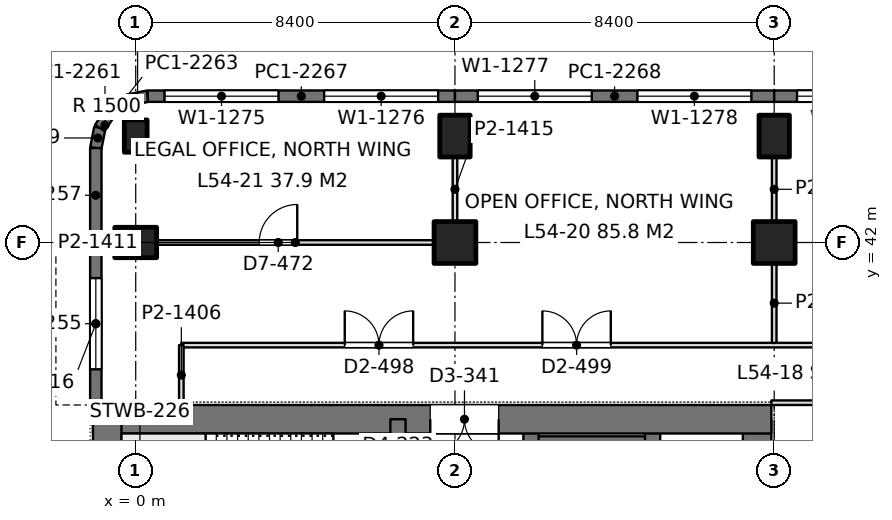
"""IFC4 building model, lengths in metres.
Left out: names, types, materials, properties, quantities, classifications, styles, units other than length and angle.
Written with IfcOpenShell. Run it as: python <this file> out.ifc"""

import sys

from ifc_helpers import new_model, si_unit, direction, frame, frame_2d, origin, origin_2d, place, context, subcontext, project, spatial, rectangle, extrude, element, fill, save


model = new_model("IFC4")
c1 = context("Model", 3, precision=1e-05, world=origin(), true_north=direction((0.0, 1.0)))
c2 = subcontext(c1, "Body", "Model", "MODEL_VIEW")
j1 = project(units=[si_unit("LENGTHUNIT", "METRE"), si_unit("PLANEANGLEUNIT", "RADIAN")], contexts=[c1])
p1 = place(None, origin())
s1 = spatial("IfcSite", under=j1, at=p1, CompositionType="ELEMENT")
p2 = place(p1, origin())
s2 = spatial("IfcBuilding", under=s1, at=p2, CompositionType="ELEMENT")
p3 = place(p2, frame((0.0, 0.0, 236.4)))
s3 = spatial("IfcBuildingStorey", under=s2, at=p3, CompositionType="ELEMENT", Elevation=236.4)
p4 = place(p3, frame((0.0, 42.0, 0.0), z_axis=(0.0, 0.0, 1.0), x_axis=(0.0, 1.0, 0.0)))
e1 = element("IfcColumn", 1, at=p4, inside=s3, PredefinedType="COLUMN", context=c2, shape_type="SweptSolid", body=[
    extrude(rectangle(XDim=0.8, YDim=1.1, at=origin_2d()), origin(), (0.0, 0.0, 1.0), 4.2),
])
p5 = place(p3, frame((0.0, 44.8, 0.0), z_axis=(0.0, 0.0, 1.0), x_axis=(1.0, 0.0, 0.0)))
e2 = element("IfcColumn", 2, at=p5, inside=s3, PredefinedType="COLUMN", context=c2, shape_type="SweptSolid", body=[
    extrude(rectangle(XDim=0.6, YDim=0.85, at=origin_2d()), origin(), (0.0, 0.0, 1.0), 4.2),
])
p6 = place(p3, frame((8.4, 42.0, 0.0), z_axis=(0.0, 0.0, 1.0), x_axis=(1.0, 0.0, 0.0)))
e3 = element("IfcColumn", 3, at=p6, inside=s3, PredefinedType="COLUMN", context=c2, shape_type="SweptSolid", body=[
    extrude(rectangle(XDim=1.1, YDim=1.1, at=origin_2d()), origin(), (0.0, 0.0, 1.0), 4.2),
])
p7 = place(p3, frame((8.4, 44.8, 0.0), z_axis=(0.0, 0.0, 1.0), x_axis=(1.0, 0.0, 0.0)))
e4 = element("IfcColumn", 4, at=p7, inside=s3, PredefinedType="COLUMN", context=c2, shape_type="SweptSolid", body=[
    extrude(rectangle(XDim=0.8, YDim=1.1, at=origin_2d()), origin(), (0.0, 0.0, 1.0), 4.2),
])
p8 = place(p3, frame((16.8, 42.0, 0.0), z_axis=(0.0, 0.0, 1.0), x_axis=(1.0, 0.0, 0.0)))
e5 = element("IfcColumn", 5, at=p8, inside=s3, PredefinedType="COLUMN", context=c2, shape_type="SweptSolid", body=[
    extrude(rectangle(XDim=1.1, YDim=1.1, at=origin_2d()), origin(), (0.0, 0.0, 1.0), 4.2),
])
p9 = place(p3, frame((16.8, 44.8, 0.0), z_axis=(0.0, 0.0, 1.0), x_axis=(1.0, 0.0, 0.0)))
e6 = element("IfcColumn", 6, at=p9, inside=s3, PredefinedType="COLUMN", context=c2, shape_type="SweptSolid", body=[
    extrude(rectangle(XDim=0.8, YDim=1.1, at=origin_2d()), origin(), (0.0, 0.0, 1.0), 4.2),
])
p10 = place(p3, frame((-1.125, 37.35, 0.0), z_axis=(0.0, 0.0, 1.0), x_axis=(1.0, 0.0, 0.0)))
e7 = element("IfcWall", 7, at=p10, inside=s3, PredefinedType="SHEAR", context=c2, shape_type="SweptSolid", body=[
    extrude(rectangle(XDim=17.85, YDim=0.75, at=frame_2d((8.925, 0.0))), origin(), (0.0, 0.0, 1.0), 4.2),
])
p11 = place(p10, frame((8.875, 0.0, 0.0)))
e8 = element("IfcOpeningElement", 8, at=p11, cuts=e7, PredefinedType="OPENING", context=c2, shape_type="SweptSolid", body=[
    extrude(rectangle(XDim=1.8, YDim=2.4, at=frame_2d((0.9, 1.2))), frame((0.0, 0.385, 0.0), z_axis=(0.0, -1.0, 0.0), x_axis=(1.0, 0.0, 0.0)), (0.0, 0.0, 1.0), 0.77),
])
p12 = place(p3, frame((-0.75, 13.05, 0.0), z_axis=(0.0, 0.0, 1.0), x_axis=(0.0, 1.0, 0.0)))
e9 = element("IfcWall", 9, at=p12, inside=s3, PredefinedType="SHEAR", context=c2, shape_type="SweptSolid", body=[
    extrude(rectangle(XDim=24.3, YDim=0.75, at=frame_2d((12.15, 0.0))), origin(), (0.0, 0.0, 1.0), 4.2),
])
p13 = place(p3, frame((16.35, 27.8, 0.0), z_axis=(0.0, 0.0, 1.0), x_axis=(0.0, 1.0, 0.0)))
e10 = element("IfcWall", 10, at=p13, inside=s3, PredefinedType="SHEAR", context=c2, shape_type="SweptSolid", body=[
    extrude(rectangle(XDim=9.55, YDim=0.75, at=frame_2d((4.775, 0.0))), origin(), (0.0, 0.0, 1.0), 4.2),
])
p14 = place(p3, frame((6.9, 13.05, 0.0), z_axis=(0.0, 0.0, 1.0), x_axis=(0.0, 1.0, 0.0)))
e11 = element("IfcWall", 11, at=p14, inside=s3, PredefinedType="SHEAR", context=c2, shape_type="SweptSolid", body=[
    extrude(rectangle(XDim=24.3, YDim=0.4, at=frame_2d((12.15, 0.0))), origin(), (0.0, 0.0, 1.0), 4.2),
])
p15 = place(p14, frame((1.3, 0.0, 0.0)))
e12 = element("IfcOpeningElement", 12, at=p15, cuts=e11, PredefinedType="OPENING", context=c2, shape_type="SweptSolid", body=[
    extrude(rectangle(XDim=1.0, YDim=2.2, at=frame_2d((0.5, 1.1))), frame((0.0, 0.21, 0.0), z_axis=(0.0, -1.0, 0.0), x_axis=(1.0, 0.0, 0.0)), (0.0, 0.0, 1.0), 0.42),
])
p16 = place(p14, frame((22.0, 0.0, 0.0)))
e13 = element("IfcOpeningElement", 13, at=p16, cuts=e11, PredefinedType="OPENING", context=c2, shape_type="SweptSolid", body=[
    extrude(rectangle(XDim=1.0, YDim=2.2, at=frame_2d((0.5, 1.1))), frame((0.0, 0.21, 0.0), z_axis=(0.0, -1.0, 0.0), x_axis=(1.0, 0.0, 0.0)), (0.0, 0.0, 1.0), 0.42),
])
p17 = place(p14, frame((5.55, 0.0, 0.0)))
e14 = element("IfcOpeningElement", 14, at=p17, cuts=e11, PredefinedType="OPENING", context=c2, shape_type="SweptSolid", body=[
    extrude(rectangle(XDim=1.0, YDim=2.2, at=frame_2d((0.5, 1.1))), frame((0.0, 0.21, 0.0), z_axis=(0.0, -1.0, 0.0), x_axis=(1.0, 0.0, 0.0)), (0.0, 0.0, 1.0), 0.42),
])
p18 = place(p14, frame((9.55, 0.0, 0.0)))
e15 = element("IfcOpeningElement", 15, at=p18, cuts=e11, PredefinedType="OPENING", context=c2, shape_type="SweptSolid", body=[
    extrude(rectangle(XDim=1.0, YDim=2.2, at=frame_2d((0.5, 1.1))), frame((0.0, 0.21, 0.0), z_axis=(0.0, -1.0, 0.0), x_axis=(1.0, 0.0, 0.0)), (0.0, 0.0, 1.0), 0.42),
])
p19 = place(p14, frame((12.8, 0.0, 0.0)))
e16 = element("IfcOpeningElement", 16, at=p19, cuts=e11, PredefinedType="OPENING", context=c2, shape_type="SweptSolid", body=[
    extrude(rectangle(XDim=1.1, YDim=2.2, at=frame_2d((0.55, 1.1))), frame((0.0, 0.21, 0.0), z_axis=(0.0, -1.0, 0.0), x_axis=(1.0, 0.0, 0.0)), (0.0, 0.0, 1.0), 0.42),
])
p20 = place(p14, frame((15.538, 0.0, 0.0)))
e17 = element("IfcOpeningElement", 17, at=p20, cuts=e11, PredefinedType="OPENING", context=c2, shape_type="SweptSolid", body=[
    extrude(rectangle(XDim=1.1, YDim=2.2, at=frame_2d((0.55, 1.1))), frame((0.0, 0.21, 0.0), z_axis=(0.0, -1.0, 0.0), x_axis=(1.0, 0.0, 0.0)), (0.0, 0.0, 1.0), 0.42),
])
p21 = place(p14, frame((18.262, 0.0, 0.0)))
e18 = element("IfcOpeningElement", 18, at=p21, cuts=e11, PredefinedType="OPENING", context=c2, shape_type="SweptSolid", body=[
    extrude(rectangle(XDim=1.1, YDim=2.2, at=frame_2d((0.55, 1.1))), frame((0.0, 0.21, 0.0), z_axis=(0.0, -1.0, 0.0), x_axis=(1.0, 0.0, 0.0)), (0.0, 0.0, 1.0), 0.42),
])
p22 = place(p3, frame((10.4, 13.05, 0.0), z_axis=(0.0, 0.0, 1.0), x_axis=(0.0, 1.0, 0.0)))
e19 = element("IfcWall", 19, at=p22, inside=s3, PredefinedType="SHEAR", context=c2, shape_type="SweptSolid", body=[
    extrude(rectangle(XDim=24.3, YDim=0.4, at=frame_2d((12.15, 0.0))), origin(), (0.0, 0.0, 1.0), 4.2),
])
p23 = place(p22, frame((15.75, 0.0, 0.0)))
e20 = element("IfcOpeningElement", 20, at=p23, cuts=e19, PredefinedType="OPENING", context=c2, shape_type="SweptSolid", body=[
    extrude(rectangle(XDim=1.1, YDim=2.2, at=frame_2d((0.55, 1.1))), frame((0.0, 0.21, 0.0), z_axis=(0.0, -1.0, 0.0), x_axis=(1.0, 0.0, 0.0)), (0.0, 0.0, 1.0), 0.42),
])
p24 = place(p22, frame((18.6, 0.0, 0.0)))
e21 = element("IfcOpeningElement", 21, at=p24, cuts=e19, PredefinedType="OPENING", context=c2, shape_type="SweptSolid", body=[
    extrude(rectangle(XDim=1.1, YDim=2.2, at=frame_2d((0.55, 1.1))), frame((0.0, 0.21, 0.0), z_axis=(0.0, -1.0, 0.0), x_axis=(1.0, 0.0, 0.0)), (0.0, 0.0, 1.0), 0.42),
])
p25 = place(p22, frame((21.45, 0.0, 0.0)))
e22 = element("IfcOpeningElement", 22, at=p25, cuts=e19, PredefinedType="OPENING", context=c2, shape_type="SweptSolid", body=[
    extrude(rectangle(XDim=1.1, YDim=2.2, at=frame_2d((0.55, 1.1))), frame((0.0, 0.21, 0.0), z_axis=(0.0, -1.0, 0.0), x_axis=(1.0, 0.0, 0.0)), (0.0, 0.0, 1.0), 0.42),
])
p26 = place(p22, frame((6.05, 0.0, 0.0)))
e23 = element("IfcOpeningElement", 23, at=p26, cuts=e19, PredefinedType="OPENING", context=c2, shape_type="SweptSolid", body=[
    extrude(rectangle(XDim=1.8, YDim=2.4, at=frame_2d((0.9, 1.2))), frame((0.0, 0.21, 0.0), z_axis=(0.0, -1.0, 0.0), x_axis=(1.0, 0.0, 0.0)), (0.0, 0.0, 1.0), 0.42),
])
p27 = place(p22, frame((11.25, 0.0, 0.0)))
e24 = element("IfcOpeningElement", 24, at=p27, cuts=e19, PredefinedType="OPENING", context=c2, shape_type="SweptSolid", body=[
    extrude(rectangle(XDim=1.8, YDim=2.4, at=frame_2d((0.9, 1.2))), frame((0.0, 0.21, 0.0), z_axis=(0.0, -1.0, 0.0), x_axis=(1.0, 0.0, 0.0)), (0.0, 0.0, 1.0), 0.42),
])
p28 = place(p3, frame((13.6, 27.925, 0.0), z_axis=(0.0, 0.0, 1.0), x_axis=(0.0, 1.0, 0.0)))
e25 = element("IfcWall", 25, at=p28, inside=s3, PredefinedType="SHEAR", context=c2, shape_type="SweptSolid", body=[
    extrude(rectangle(XDim=9.425, YDim=0.4, at=frame_2d((4.712, 0.0))), origin(), (0.0, 0.0, 1.0), 4.2),
])
p29 = place(p3, frame((10.4, 36.625, 0.0), z_axis=(0.0, 0.0, 1.0), x_axis=(1.0, 0.0, 0.0)))
e26 = element("IfcWall", 26, at=p29, inside=s3, PredefinedType="SHEAR", context=c2, shape_type="SweptSolid", body=[
    extrude(rectangle(XDim=3.2, YDim=0.55, at=frame_2d((1.6, 0.0))), origin(), (0.0, 0.0, 1.0), 4.2),
])
p30 = place(p3, frame((-1.05, 37.725, 0.0), z_axis=(0.0, 0.0, 1.0), x_axis=(0.0, 1.0, 0.0)))
e27 = element("IfcWall", 27, at=p30, inside=s3, PredefinedType="SOLIDWALL", context=c2, shape_type="SweptSolid", body=[
    extrude(rectangle(XDim=4.275, YDim=0.3, at=frame_2d((2.137, 0.0))), origin(), (0.0, 0.0, 1.0), 4.05),
])
p31 = place(p30, frame((0.938, 0.0, 0.9)))
e28 = element("IfcOpeningElement", 28, at=p31, cuts=e27, PredefinedType="OPENING", context=c2, shape_type="SweptSolid", body=[
    extrude(rectangle(XDim=2.4, YDim=1.9, at=frame_2d((1.2, 0.95))), frame((0.0, 0.16, 0.0), z_axis=(0.0, -1.0, 0.0), x_axis=(1.0, 0.0, 0.0)), (0.0, 0.0, 1.0), 0.32),
])
p32 = place(p3, frame((-1.05, 42.0, 0.0), z_axis=(0.0, 0.0, 1.0), x_axis=(0.0, 1.0, 0.0)))
e29 = element("IfcWall", 29, at=p32, inside=s3, PredefinedType="SOLIDWALL", context=c2, shape_type="SweptSolid", body=[
    extrude(rectangle(XDim=2.485, YDim=0.3, at=frame_2d((1.243, 0.0))), origin(), (0.0, 0.0, 1.0), 4.05),
])
p33 = place(p3, frame((-1.05, 44.485, 0.0), z_axis=(0.0, 0.0, 1.0), x_axis=(0.195073962632, 0.980788534345, 0.0)))
e30 = element("IfcWall", 30, at=p33, inside=s3, PredefinedType="SOLIDWALL", context=c2, shape_type="SweptSolid", body=[
    extrude(rectangle(XDim=0.541, YDim=0.3, at=frame_2d((0.271, 0.0))), origin(), (0.0, 0.0, 1.0), 4.05),
])
p34 = place(p3, frame((-0.945, 45.015, 0.0), z_axis=(0.0, 0.0, 1.0), x_axis=(0.55534295404, 0.831621430339, 0.0)))
e31 = element("IfcWall", 31, at=p34, inside=s3, PredefinedType="SOLIDWALL", context=c2, shape_type="SweptSolid", body=[
    extrude(rectangle(XDim=0.526, YDim=0.3, at=frame_2d((0.263, 0.0))), origin(), (0.0, 0.0, 1.0), 4.05),
])
p35 = place(p3, frame((-0.653, 45.453, 0.0), z_axis=(0.0, 0.0, 1.0), x_axis=(0.831692711774, 0.555236195849, 0.0)))
e32 = element("IfcWall", 32, at=p35, inside=s3, PredefinedType="SOLIDWALL", context=c2, shape_type="SweptSolid", body=[
    extrude(rectangle(XDim=0.525, YDim=0.3, at=frame_2d((0.263, 0.0))), origin(), (0.0, 0.0, 1.0), 4.05),
])
p36 = place(p3, frame((-0.216, 45.744, 0.0), z_axis=(0.0, 0.0, 1.0), x_axis=(0.980702050465, 0.1955082817, 0.0)))
e33 = element("IfcWall", 33, at=p36, inside=s3, PredefinedType="SOLIDWALL", context=c2, shape_type="SweptSolid", body=[
    extrude(rectangle(XDim=0.541, YDim=0.3, at=frame_2d((0.271, 0.0))), origin(), (0.0, 0.0, 1.0), 4.05),
])
p37 = place(p3, frame((0.315, 45.85, 0.0), z_axis=(0.0, 0.0, 1.0), x_axis=(1.0, 0.0, 0.0)))
e34 = element("IfcWall", 34, at=p37, inside=s3, PredefinedType="SOLIDWALL", context=c2, shape_type="SweptSolid", body=[
    extrude(rectangle(XDim=8.085, YDim=0.3, at=frame_2d((4.042, 0.0))), origin(), (0.0, 0.0, 1.0), 4.05),
])
p38 = place(p37, frame((0.443, 0.0, 0.9)))
e35 = element("IfcOpeningElement", 35, at=p38, cuts=e34, PredefinedType="OPENING", context=c2, shape_type="SweptSolid", body=[
    extrude(rectangle(XDim=3.0, YDim=1.9, at=frame_2d((1.5, 0.95))), frame((0.0, 0.16, 0.0), z_axis=(0.0, -1.0, 0.0), x_axis=(1.0, 0.0, 0.0)), (0.0, 0.0, 1.0), 0.32),
])
p39 = place(p37, frame((4.643, 0.0, 0.9)))
e36 = element("IfcOpeningElement", 36, at=p39, cuts=e34, PredefinedType="OPENING", context=c2, shape_type="SweptSolid", body=[
    extrude(rectangle(XDim=3.0, YDim=1.9, at=frame_2d((1.5, 0.95))), frame((0.0, 0.16, 0.0), z_axis=(0.0, -1.0, 0.0), x_axis=(1.0, 0.0, 0.0)), (0.0, 0.0, 1.0), 0.32),
])
p40 = place(p3, frame((8.4, 45.85, 0.0), z_axis=(0.0, 0.0, 1.0), x_axis=(1.0, 0.0, 0.0)))
e37 = element("IfcWall", 37, at=p40, inside=s3, PredefinedType="SOLIDWALL", context=c2, shape_type="SweptSolid", body=[
    extrude(rectangle(XDim=8.4, YDim=0.3, at=frame_2d((4.2, 0.0))), origin(), (0.0, 0.0, 1.0), 4.05),
])
p41 = place(p40, frame((0.6, 0.0, 0.9)))
e38 = element("IfcOpeningElement", 38, at=p41, cuts=e37, PredefinedType="OPENING", context=c2, shape_type="SweptSolid", body=[
    extrude(rectangle(XDim=3.0, YDim=1.9, at=frame_2d((1.5, 0.95))), frame((0.0, 0.16, 0.0), z_axis=(0.0, -1.0, 0.0), x_axis=(1.0, 0.0, 0.0)), (0.0, 0.0, 1.0), 0.32),
])
p42 = place(p40, frame((4.8, 0.0, 0.9)))
e39 = element("IfcOpeningElement", 39, at=p42, cuts=e37, PredefinedType="OPENING", context=c2, shape_type="SweptSolid", body=[
    extrude(rectangle(XDim=3.0, YDim=1.9, at=frame_2d((1.5, 0.95))), frame((0.0, 0.16, 0.0), z_axis=(0.0, -1.0, 0.0), x_axis=(1.0, 0.0, 0.0)), (0.0, 0.0, 1.0), 0.32),
])
p43 = place(p3, frame((16.8, 45.85, 0.0), z_axis=(0.0, 0.0, 1.0), x_axis=(1.0, 0.0, 0.0)))
e40 = element("IfcWall", 40, at=p43, inside=s3, PredefinedType="SOLIDWALL", context=c2, shape_type="SweptSolid", body=[
    extrude(rectangle(XDim=8.4, YDim=0.3, at=frame_2d((4.2, 0.0))), origin(), (0.0, 0.0, 1.0), 4.05),
])
p44 = place(p43, frame((0.6, 0.0, 0.9)))
e41 = element("IfcOpeningElement", 41, at=p44, cuts=e40, PredefinedType="OPENING", context=c2, shape_type="SweptSolid", body=[
    extrude(rectangle(XDim=3.0, YDim=1.9, at=frame_2d((1.5, 0.95))), frame((0.0, 0.16, 0.0), z_axis=(0.0, -1.0, 0.0), x_axis=(1.0, 0.0, 0.0)), (0.0, 0.0, 1.0), 0.32),
])
p45 = place(p43, frame((4.8, 0.0, 0.9)))
e42 = element("IfcOpeningElement", 42, at=p45, cuts=e40, PredefinedType="OPENING", context=c2, shape_type="SweptSolid", body=[
    extrude(rectangle(XDim=3.0, YDim=1.9, at=frame_2d((1.5, 0.95))), frame((0.0, 0.16, 0.0), z_axis=(0.0, -1.0, 0.0), x_axis=(1.0, 0.0, 0.0)), (0.0, 0.0, 1.0), 0.32),
])
p46 = place(p3, frame((0.549, 42.0, 0.0), z_axis=(0.0, 0.0, 1.0), x_axis=(1.0, 0.0, 0.0)))
e43 = element("IfcWall", 43, at=p46, inside=s3, PredefinedType="PARTITIONING", context=c2, shape_type="SweptSolid", body=[
    extrude(rectangle(XDim=7.302, YDim=0.12, at=frame_2d((3.651, 0.0))), origin(), (0.0, 0.0, 1.0), 3.55),
])
p47 = place(p46, frame((2.701, 0.0, 0.0)))
e44 = element("IfcOpeningElement", 44, at=p47, cuts=e43, PredefinedType="OPENING", context=c2, shape_type="SweptSolid", body=[
    extrude(rectangle(XDim=1.0, YDim=2.4, at=frame_2d((0.5, 1.2))), frame((0.0, 0.07, 0.0), z_axis=(0.0, -1.0, 0.0), x_axis=(1.0, 0.0, 0.0)), (0.0, 0.0, 1.0), 0.14),
])
p48 = place(p3, frame((8.4, 42.549, 0.0), z_axis=(0.0, 0.0, 1.0), x_axis=(0.0, 1.0, 0.0)))
e45 = element("IfcWall", 45, at=p48, inside=s3, PredefinedType="PARTITIONING", context=c2, shape_type="SweptSolid", body=[
    extrude(rectangle(XDim=1.702, YDim=0.12, at=frame_2d((0.851, 0.0))), origin(), (0.0, 0.0, 1.0), 3.15),
])
p49 = place(p3, frame((16.8, 39.358, 0.0), z_axis=(0.0, 0.0, 1.0), x_axis=(0.0, 1.0, 0.0)))
e46 = element("IfcWall", 46, at=p49, inside=s3, PredefinedType="PARTITIONING", context=c2, shape_type="SweptSolid", body=[
    extrude(rectangle(XDim=2.093, YDim=0.12, at=frame_2d((1.046, 0.0))), origin(), (0.0, 0.0, 1.0), 3.69),
])
p50 = place(p3, frame((16.8, 42.549, 0.0), z_axis=(0.0, 0.0, 1.0), x_axis=(0.0, 1.0, 0.0)))
e47 = element("IfcWall", 47, at=p50, inside=s3, PredefinedType="PARTITIONING", context=c2, shape_type="SweptSolid", body=[
    extrude(rectangle(XDim=1.702, YDim=0.12, at=frame_2d((0.851, 0.0))), origin(), (0.0, 0.0, 1.0), 3.15),
])
p51 = place(p3, frame((1.2, 39.3, 0.0), z_axis=(0.0, 0.0, 1.0), x_axis=(1.0, 0.0, 0.0)))
e48 = element("IfcWall", 48, at=p51, inside=s3, PredefinedType="PARTITIONING", context=c2, shape_type="SweptSolid", body=[
    extrude(rectangle(XDim=41.452, YDim=0.12, at=frame_2d((20.726, 0.0))), origin(), (0.0, 0.0, 1.0), 3.55),
])
p52 = place(p51, frame((4.3, 0.0, 0.0)))
e49 = element("IfcOpeningElement", 49, at=p52, cuts=e48, PredefinedType="OPENING", context=c2, shape_type="SweptSolid", body=[
    extrude(rectangle(XDim=1.8, YDim=2.2, at=frame_2d((0.9, 1.1))), frame((0.0, 0.07, 0.0), z_axis=(0.0, -1.0, 0.0), x_axis=(1.0, 0.0, 0.0)), (0.0, 0.0, 1.0), 0.14),
])
p53 = place(p51, frame((9.5, 0.0, 0.0)))
e50 = element("IfcOpeningElement", 50, at=p53, cuts=e48, PredefinedType="OPENING", context=c2, shape_type="SweptSolid", body=[
    extrude(rectangle(XDim=1.8, YDim=2.2, at=frame_2d((0.9, 1.1))), frame((0.0, 0.07, 0.0), z_axis=(0.0, -1.0, 0.0), x_axis=(1.0, 0.0, 0.0)), (0.0, 0.0, 1.0), 0.14),
])
p54 = place(p51, frame((23.317, 0.0, 0.0)))
e51 = element("IfcOpeningElement", 51, at=p54, cuts=e48, PredefinedType="OPENING", context=c2, shape_type="SweptSolid", body=[
    extrude(rectangle(XDim=1.8, YDim=2.2, at=frame_2d((0.9, 1.1))), frame((0.0, 0.07, 0.0), z_axis=(0.0, -1.0, 0.0), x_axis=(1.0, 0.0, 0.0)), (0.0, 0.0, 1.0), 0.14),
])
p55 = place(p51, frame((31.933, 0.0, 0.0)))
e52 = element("IfcOpeningElement", 52, at=p55, cuts=e48, PredefinedType="OPENING", context=c2, shape_type="SweptSolid", body=[
    extrude(rectangle(XDim=1.8, YDim=2.2, at=frame_2d((0.9, 1.1))), frame((0.0, 0.07, 0.0), z_axis=(0.0, -1.0, 0.0), x_axis=(1.0, 0.0, 0.0)), (0.0, 0.0, 1.0), 0.14),
])
p56 = place(p3, frame((1.2, 37.724, 0.0), z_axis=(0.0, 0.0, 1.0), x_axis=(0.0, 1.0, 0.0)))
e53 = element("IfcWall", 53, at=p56, inside=s3, PredefinedType="PARTITIONING", context=c2, shape_type="SweptSolid", body=[
    extrude(rectangle(XDim=1.576, YDim=0.12, at=frame_2d((0.788, 0.0))), origin(), (0.0, 0.0, 1.0), 4.05),
])
p57 = place(p3, frame((16.725, 37.785, 0.0), z_axis=(0.0, 0.0, 1.0), x_axis=(1.0, 0.0, 0.0)))
e54 = element("IfcWall", 54, at=p57, inside=s3, PredefinedType="PARTITIONING", context=c2, shape_type="SweptSolid", body=[
    extrude(rectangle(XDim=16.95, YDim=0.12, at=frame_2d((8.475, 0.0))), origin(), (0.0, 0.0, 1.0), 3.55),
])
p58 = place(p57, frame((7.575, 0.0, 0.0)))
e55 = element("IfcOpeningElement", 55, at=p58, cuts=e54, PredefinedType="OPENING", context=c2, shape_type="SweptSolid", body=[
    extrude(rectangle(XDim=1.8, YDim=2.2, at=frame_2d((0.9, 1.1))), frame((0.0, 0.07, 0.0), z_axis=(0.0, -1.0, 0.0), x_axis=(1.0, 0.0, 0.0)), (0.0, 0.0, 1.0), 0.14),
])
p59 = place(p31, origin())
e56 = element("IfcWindow", 56, at=p59, inside=s3, PartitioningType="SINGLE_PANEL", PredefinedType="WINDOW", context=c2, shape_type="SweptSolid", body=[
    extrude(rectangle(XDim=2.4, YDim=1.9, at=frame_2d((1.2, 0.95))), frame((0.0, 0.03, 0.0), z_axis=(0.0, -1.0, 0.0), x_axis=(1.0, 0.0, 0.0)), (0.0, 0.0, 1.0), 0.06),
])
fill(e28, e56)
p60 = place(p38, origin())
e57 = element("IfcWindow", 57, at=p60, inside=s3, PartitioningType="SINGLE_PANEL", PredefinedType="WINDOW", context=c2, shape_type="SweptSolid", body=[
    extrude(rectangle(XDim=3.0, YDim=1.9, at=frame_2d((1.5, 0.95))), frame((0.0, 0.03, 0.0), z_axis=(0.0, -1.0, 0.0), x_axis=(1.0, 0.0, 0.0)), (0.0, 0.0, 1.0), 0.06),
])
fill(e35, e57)
p61 = place(p39, origin())
e58 = element("IfcWindow", 58, at=p61, inside=s3, PartitioningType="SINGLE_PANEL", PredefinedType="WINDOW", context=c2, shape_type="SweptSolid", body=[
    extrude(rectangle(XDim=3.0, YDim=1.9, at=frame_2d((1.5, 0.95))), frame((0.0, 0.03, 0.0), z_axis=(0.0, -1.0, 0.0), x_axis=(1.0, 0.0, 0.0)), (0.0, 0.0, 1.0), 0.06),
])
fill(e36, e58)
p62 = place(p41, origin())
e59 = element("IfcWindow", 59, at=p62, inside=s3, PartitioningType="SINGLE_PANEL", PredefinedType="WINDOW", context=c2, shape_type="SweptSolid", body=[
    extrude(rectangle(XDim=3.0, YDim=1.9, at=frame_2d((1.5, 0.95))), frame((0.0, 0.03, 0.0), z_axis=(0.0, -1.0, 0.0), x_axis=(1.0, 0.0, 0.0)), (0.0, 0.0, 1.0), 0.06),
])
fill(e38, e59)
p63 = place(p42, origin())
e60 = element("IfcWindow", 60, at=p63, inside=s3, PartitioningType="SINGLE_PANEL", PredefinedType="WINDOW", context=c2, shape_type="SweptSolid", body=[
    extrude(rectangle(XDim=3.0, YDim=1.9, at=frame_2d((1.5, 0.95))), frame((0.0, 0.03, 0.0), z_axis=(0.0, -1.0, 0.0), x_axis=(1.0, 0.0, 0.0)), (0.0, 0.0, 1.0), 0.06),
])
fill(e39, e60)
p64 = place(p44, origin())
e61 = element("IfcWindow", 61, at=p64, inside=s3, PartitioningType="SINGLE_PANEL", PredefinedType="WINDOW", context=c2, shape_type="SweptSolid", body=[
    extrude(rectangle(XDim=3.0, YDim=1.9, at=frame_2d((1.5, 0.95))), frame((0.0, 0.03, 0.0), z_axis=(0.0, -1.0, 0.0), x_axis=(1.0, 0.0, 0.0)), (0.0, 0.0, 1.0), 0.06),
])
fill(e41, e61)
p65 = place(p11, frame((1.8, 0.0, 0.0), z_axis=(0.0, 0.0, 1.0), x_axis=(-1.0, 0.0, 0.0)))
e62 = element("IfcDoor", 62, at=p65, inside=s3, OperationType="DOUBLE_DOOR_SINGLE_SWING", PredefinedType="DOOR", context=c2, shape_type="SweptSolid", body=[
    extrude(rectangle(XDim=1.8, YDim=2.4, at=frame_2d((0.9, 1.2))), frame((0.0, 0.025, 0.0), z_axis=(0.0, -1.0, 0.0), x_axis=(1.0, 0.0, 0.0)), (0.0, 0.0, 1.0), 0.05),
])
fill(e8, e62)
p66 = place(p47, origin())
e63 = element("IfcDoor", 63, at=p66, inside=s3, OperationType="SINGLE_SWING_RIGHT", PredefinedType="DOOR", context=c2, shape_type="SweptSolid", body=[
    extrude(rectangle(XDim=1.0, YDim=2.4, at=frame_2d((0.5, 1.2))), frame((0.0, 0.025, 0.0), z_axis=(0.0, -1.0, 0.0), x_axis=(1.0, 0.0, 0.0)), (0.0, 0.0, 1.0), 0.05),
])
fill(e44, e63)
p67 = place(p52, origin())
e64 = element("IfcDoor", 64, at=p67, inside=s3, OperationType="DOUBLE_DOOR_SINGLE_SWING", PredefinedType="DOOR", context=c2, shape_type="SweptSolid", body=[
    extrude(rectangle(XDim=1.8, YDim=2.2, at=frame_2d((0.9, 1.1))), frame((0.0, 0.025, 0.0), z_axis=(0.0, -1.0, 0.0), x_axis=(1.0, 0.0, 0.0)), (0.0, 0.0, 1.0), 0.05),
])
fill(e49, e64)
p68 = place(p53, origin())
e65 = element("IfcDoor", 65, at=p68, inside=s3, OperationType="DOUBLE_DOOR_SINGLE_SWING", PredefinedType="DOOR", context=c2, shape_type="SweptSolid", body=[
    extrude(rectangle(XDim=1.8, YDim=2.2, at=frame_2d((0.9, 1.1))), frame((0.0, 0.025, 0.0), z_axis=(0.0, -1.0, 0.0), x_axis=(1.0, 0.0, 0.0)), (0.0, 0.0, 1.0), 0.05),
])
fill(e50, e65)
save(model, sys.argv[1])
